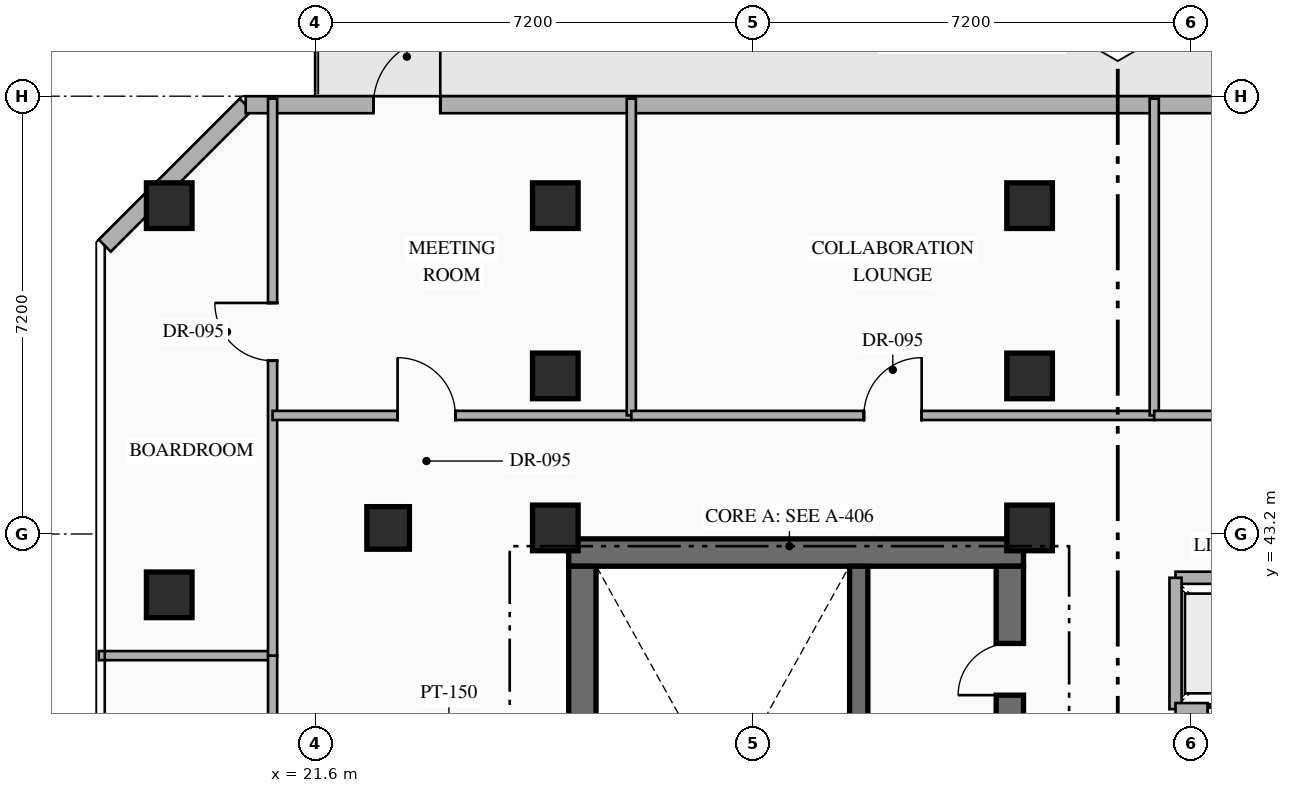
"""IFC4 building model, lengths in metres.
Left out: names, types, materials, properties, quantities, classifications, styles, units other than length and angle.
Written with IfcOpenShell. Run it as: python <this file> out.ifc"""

import sys

from ifc_helpers import new_model, si_unit, direction, frame, frame_2d, origin, origin_2d, place, context, subcontext, project, spatial, rectangle, hollow_rectangle, extrude, element, fill, save


model = new_model("IFC4")
c1 = context("Model", 3, precision=1e-05, world=origin(), true_north=direction((0.0, 1.0)))
c2 = subcontext(c1, "Body", "Model", "MODEL_VIEW")
j1 = project(units=[si_unit("LENGTHUNIT", "METRE"), si_unit("PLANEANGLEUNIT", "RADIAN")], contexts=[c1])
p1 = place(None, origin())
s1 = spatial("IfcSite", under=j1, at=p1, CompositionType="ELEMENT")
p2 = place(p1, origin())
s2 = spatial("IfcBuilding", under=s1, at=p2, CompositionType="ELEMENT")
p3 = place(p2, frame((0.0, 0.0, 202.35)))
s3 = spatial("IfcBuildingStorey", under=s2, at=p3, CompositionType="ELEMENT", Elevation=202.35)
p4 = place(p3, frame((25.77, 42.895, 0.0), z_axis=(0.0, 0.0, 1.0), x_axis=(1.0, 0.0, 0.0)))
e1 = element("IfcWall", 1, at=p4, inside=s3, PredefinedType="SHEAR", context=c2, shape_type="SweptSolid", body=[
    extrude(rectangle(XDim=7.48, YDim=0.45, at=frame_2d((3.74, 0.0))), origin(), (0.0, 0.0, 1.0), 3.6),
])
p5 = place(p3, frame((25.995, 33.19, 0.0), z_axis=(0.0, 0.0, 1.0), x_axis=(0.0, 1.0, 0.0)))
e2 = element("IfcWall", 2, at=p5, inside=s3, PredefinedType="SHEAR", context=c2, shape_type="SweptSolid", body=[
    extrude(rectangle(XDim=9.48, YDim=0.45, at=frame_2d((4.74, 0.0))), origin(), (0.0, 0.0, 1.0), 3.6),
])
p6 = place(p3, frame((33.025, 33.19, 0.0), z_axis=(0.0, 0.0, 1.0), x_axis=(0.0, 1.0, 0.0)))
e3 = element("IfcWall", 3, at=p6, inside=s3, PredefinedType="SHEAR", context=c2, shape_type="SweptSolid", body=[
    extrude(rectangle(XDim=9.48, YDim=0.45, at=frame_2d((4.74, 0.0))), origin(), (0.0, 0.0, 1.0), 3.6),
])
p7 = place(p6, frame((4.16, 0.0, 0.0)))
e4 = element("IfcOpeningElement", 4, at=p7, cuts=e3, PredefinedType="OPENING", context=c2, shape_type="SweptSolid", body=[
    extrude(rectangle(XDim=0.85, YDim=2.08, at=frame_2d((0.425, 1.04))), frame((0.0, 0.235, 0.0), z_axis=(0.0, -1.0, 0.0), x_axis=(1.0, 0.0, 0.0)), (0.0, 0.0, 1.0), 0.47),
])
p8 = place(p6, frame((7.36, 0.0, 0.0)))
e5 = element("IfcOpeningElement", 5, at=p8, cuts=e3, PredefinedType="OPENING", context=c2, shape_type="SweptSolid", body=[
    extrude(rectangle(XDim=0.85, YDim=2.08, at=frame_2d((0.425, 1.04))), frame((0.0, 0.235, 0.0), z_axis=(0.0, -1.0, 0.0), x_axis=(1.0, 0.0, 0.0)), (0.0, 0.0, 1.0), 0.47),
])
p9 = place(p3, frame((30.54, 33.19, 0.0), z_axis=(0.0, 0.0, 1.0), x_axis=(0.0, 1.0, 0.0)))
e6 = element("IfcWall", 6, at=p9, inside=s3, PredefinedType="SHEAR", context=c2, shape_type="SweptSolid", body=[
    extrude(rectangle(XDim=9.48, YDim=0.3, at=frame_2d((4.74, 0.0))), origin(), (0.0, 0.0, 1.0), 3.6),
])
for number, where, z_axis, x_axis in (
    (7, (25.55, 43.3, 0.0), (0.0, 0.0, 1.0), (1.0, 0.0, 0.0)),
    (8, (33.35, 43.3, 0.0), (0.0, 0.0, 1.0), (1.0, 0.0, 0.0)),
    (9, (25.55, 45.8, 0.0), (0.0, 0.0, 1.0), (1.0, 0.0, 0.0)),
    (10, (33.35, 45.8, 0.0), (0.0, 0.0, 1.0), (1.0, 0.0, 0.0)),
    (11, (19.2, 48.6, 0.0), (0.0, 0.0, 1.0), (1.0, 0.0, 0.0)),
    (12, (25.55, 48.6, 0.0), (0.0, 0.0, 1.0), (1.0, 0.0, 0.0)),
    (13, (33.35, 48.6, 0.0), (0.0, 0.0, 1.0), (1.0, 0.0, 0.0)),
    (14, (19.2, 42.2, 0.0), (0.0, 0.0, 1.0), (1.0, 0.0, 0.0)),
):
    element("IfcColumn", number, at=place(p3, frame(where, z_axis=z_axis, x_axis=x_axis)), inside=s3, PredefinedType="COLUMN", context=c2, shape_type="SweptSolid", body=[
        extrude(hollow_rectangle(XDim=0.75, YDim=0.75, WallThickness=0.028, at=origin_2d()), origin(), (0.0, 0.0, 1.0), 3.6),
    ])
p10 = place(p3, frame((22.8, 43.3, 0.0), z_axis=(0.0, 0.0, 1.0), x_axis=(1.0, 0.0, 0.0)))
e15 = element("IfcColumn", 15, at=p10, inside=s3, PredefinedType="COLUMN", context=c2, shape_type="SweptSolid", body=[
    extrude(hollow_rectangle(XDim=0.7, YDim=0.7, WallThickness=0.028, at=origin_2d()), origin(), (0.0, 0.0, 1.0), 3.6),
])
p11 = place(p3, frame((18.14, 47.942, 0.0), z_axis=(0.0, 0.0, 1.0), x_axis=(0.707106781187, 0.707106781187, 0.0)))
e16 = element("IfcWall", 16, at=p11, inside=s3, PredefinedType="STANDARD", context=c2, shape_type="SweptSolid", body=[
    extrude(rectangle(XDim=3.278, YDim=0.28, at=frame_2d((1.639, 0.0))), origin(), (0.0, 0.0, 1.0), 3.35),
])
p12 = place(p3, frame((20.458, 50.26, 0.0), z_axis=(0.0, 0.0, 1.0), x_axis=(1.0, 0.0, 0.0)))
e17 = element("IfcWall", 17, at=p12, inside=s3, PredefinedType="STANDARD", context=c2, shape_type="SweptSolid", body=[
    extrude(rectangle(XDim=22.084, YDim=0.28, at=frame_2d((11.042, 0.0))), origin(), (0.0, 0.0, 1.0), 3.35),
])
p13 = place(p12, frame((2.1, 0.0, 0.0)))
e18 = element("IfcOpeningElement", 18, at=p13, cuts=e17, PredefinedType="OPENING", context=c2, shape_type="SweptSolid", body=[
    extrude(rectangle(XDim=1.1, YDim=2.2, at=frame_2d((0.55, 1.1))), frame((0.0, 0.15, 0.0), z_axis=(0.0, -1.0, 0.0), x_axis=(1.0, 0.0, 0.0)), (0.0, 0.0, 1.0), 0.3),
])
p14 = place(p3, frame((35.75, 42.48, 0.0), z_axis=(0.0, 0.0, 1.0), x_axis=(1.0, 0.0, 0.0)))
e19 = element("IfcWall", 19, at=p14, inside=s3, PredefinedType="STANDARD", context=c2, shape_type="SweptSolid", body=[
    extrude(rectangle(XDim=9.11, YDim=0.2, at=frame_2d((4.555, 0.0))), origin(), (0.0, 0.0, 1.0), 3.35),
])
p15 = place(p3, frame((35.75, 40.32, 0.0), z_axis=(0.0, 0.0, 1.0), x_axis=(0.0, 1.0, 0.0)))
e20 = element("IfcWall", 20, at=p15, inside=s3, PredefinedType="STANDARD", context=c2, shape_type="SweptSolid", body=[
    extrude(rectangle(XDim=2.16, YDim=0.2, at=frame_2d((1.08, 0.0))), origin(), (0.0, 0.0, 1.0), 3.35),
])
p16 = place(p3, frame((35.75, 40.32, 0.0), z_axis=(0.0, 0.0, 1.0), x_axis=(1.0, 0.0, 0.0)))
e21 = element("IfcWall", 21, at=p16, inside=s3, PredefinedType="STANDARD", context=c2, shape_type="SweptSolid", body=[
    extrude(rectangle(XDim=9.11, YDim=0.2, at=frame_2d((4.555, 0.0))), origin(), (0.0, 0.0, 1.0), 3.35),
])
p17 = place(p16, frame((0.53, 0.0, 0.0)))
e22 = element("IfcOpeningElement", 22, at=p17, cuts=e21, PredefinedType="OPENING", context=c2, shape_type="SweptSolid", body=[
    extrude(rectangle(XDim=1.1, YDim=2.18, at=frame_2d((0.55, 1.09))), frame((0.0, 0.11, 0.0), z_axis=(0.0, -1.0, 0.0), x_axis=(1.0, 0.0, 0.0)), (0.0, 0.0, 1.0), 0.22),
])
p18 = place(p16, frame((2.73, 0.0, 0.0)))
e23 = element("IfcOpeningElement", 23, at=p18, cuts=e21, PredefinedType="OPENING", context=c2, shape_type="SweptSolid", body=[
    extrude(rectangle(XDim=1.1, YDim=2.18, at=frame_2d((0.55, 1.09))), frame((0.0, 0.11, 0.0), z_axis=(0.0, -1.0, 0.0), x_axis=(1.0, 0.0, 0.0)), (0.0, 0.0, 1.0), 0.22),
])
p19 = place(p16, frame((4.93, 0.0, 0.0)))
e24 = element("IfcOpeningElement", 24, at=p19, cuts=e21, PredefinedType="OPENING", context=c2, shape_type="SweptSolid", body=[
    extrude(rectangle(XDim=1.1, YDim=2.18, at=frame_2d((0.55, 1.09))), frame((0.0, 0.11, 0.0), z_axis=(0.0, -1.0, 0.0), x_axis=(1.0, 0.0, 0.0)), (0.0, 0.0, 1.0), 0.22),
])
p20 = place(p16, frame((7.13, 0.0, 0.0)))
e25 = element("IfcOpeningElement", 25, at=p20, cuts=e21, PredefinedType="OPENING", context=c2, shape_type="SweptSolid", body=[
    extrude(rectangle(XDim=1.1, YDim=2.18, at=frame_2d((0.55, 1.09))), frame((0.0, 0.11, 0.0), z_axis=(0.0, -1.0, 0.0), x_axis=(1.0, 0.0, 0.0)), (0.0, 0.0, 1.0), 0.22),
])
p21 = place(p3, frame((18.04, 41.2, 0.0), z_axis=(0.0, 0.0, 1.0), x_axis=(1.0, 0.0, 0.0)))
e26 = element("IfcWall", 26, at=p21, inside=s3, PredefinedType="PARTITIONING", context=c2, shape_type="SweptSolid", body=[
    extrude(rectangle(XDim=2.86, YDim=0.15, at=frame_2d((1.43, 0.0))), origin(), (0.0, 0.0, 1.0), 3.35),
])
p22 = place(p3, frame((20.9, 31.8, 0.0), z_axis=(0.0, 0.0, 1.0), x_axis=(0.0, 1.0, 0.0)))
e27 = element("IfcWall", 27, at=p22, inside=s3, PredefinedType="PARTITIONING", context=c2, shape_type="SweptSolid", body=[
    extrude(rectangle(XDim=9.4, YDim=0.15, at=frame_2d((4.7, 0.0))), origin(), (0.0, 0.0, 1.0), 3.35),
])
p23 = place(p22, frame((0.38, 0.0, 0.0)))
e28 = element("IfcOpeningElement", 28, at=p23, cuts=e27, PredefinedType="OPENING", context=c2, shape_type="SweptSolid", body=[
    extrude(rectangle(XDim=0.95, YDim=2.15, at=frame_2d((0.475, 1.075))), frame((0.0, 0.085, 0.0), z_axis=(0.0, -1.0, 0.0), x_axis=(1.0, 0.0, 0.0)), (0.0, 0.0, 1.0), 0.17),
])
p24 = place(p3, frame((20.9, 41.2, 0.0), z_axis=(0.0, 0.0, 1.0), x_axis=(0.0, 1.0, 0.0)))
e29 = element("IfcWall", 29, at=p24, inside=s3, PredefinedType="PARTITIONING", context=c2, shape_type="SweptSolid", body=[
    extrude(rectangle(XDim=9.16, YDim=0.15, at=frame_2d((4.58, 0.0))), origin(), (0.0, 0.0, 1.0), 3.35),
])
p25 = place(p24, frame((4.85, 0.0, 0.0)))
e30 = element("IfcOpeningElement", 30, at=p25, cuts=e29, PredefinedType="OPENING", context=c2, shape_type="SweptSolid", body=[
    extrude(rectangle(XDim=0.95, YDim=2.15, at=frame_2d((0.475, 1.075))), frame((0.0, 0.085, 0.0), z_axis=(0.0, -1.0, 0.0), x_axis=(1.0, 0.0, 0.0)), (0.0, 0.0, 1.0), 0.17),
])
p26 = place(p3, frame((20.9, 45.15, 0.0), z_axis=(0.0, 0.0, 1.0), x_axis=(1.0, 0.0, 0.0)))
e31 = element("IfcWall", 31, at=p26, inside=s3, PredefinedType="PARTITIONING", context=c2, shape_type="SweptSolid", body=[
    extrude(rectangle(XDim=5.9, YDim=0.15, at=frame_2d((2.95, 0.0))), origin(), (0.0, 0.0, 1.0), 3.35),
])
p27 = place(p26, frame((2.056, 0.0, 0.0)))
e32 = element("IfcOpeningElement", 32, at=p27, cuts=e31, PredefinedType="OPENING", context=c2, shape_type="SweptSolid", body=[
    extrude(rectangle(XDim=0.95, YDim=2.15, at=frame_2d((0.475, 1.075))), frame((0.0, 0.085, 0.0), z_axis=(0.0, -1.0, 0.0), x_axis=(1.0, 0.0, 0.0)), (0.0, 0.0, 1.0), 0.17),
])
p28 = place(p3, frame((26.8, 45.15, 0.0), z_axis=(0.0, 0.0, 1.0), x_axis=(0.0, 1.0, 0.0)))
e33 = element("IfcWall", 33, at=p28, inside=s3, PredefinedType="PARTITIONING", context=c2, shape_type="SweptSolid", body=[
    extrude(rectangle(XDim=5.21, YDim=0.15, at=frame_2d((2.605, 0.0))), origin(), (0.0, 0.0, 1.0), 3.35),
])
p29 = place(p3, frame((26.8, 45.15, 0.0), z_axis=(0.0, 0.0, 1.0), x_axis=(1.0, 0.0, 0.0)))
e34 = element("IfcWall", 34, at=p29, inside=s3, PredefinedType="PARTITIONING", context=c2, shape_type="SweptSolid", body=[
    extrude(rectangle(XDim=8.6, YDim=0.15, at=frame_2d((4.3, 0.0))), origin(), (0.0, 0.0, 1.0), 3.35),
])
p30 = place(p29, frame((3.825, 0.0, 0.0)))
e35 = element("IfcOpeningElement", 35, at=p30, cuts=e34, PredefinedType="OPENING", context=c2, shape_type="SweptSolid", body=[
    extrude(rectangle(XDim=0.95, YDim=2.15, at=frame_2d((0.475, 1.075))), frame((0.0, 0.085, 0.0), z_axis=(0.0, -1.0, 0.0), x_axis=(1.0, 0.0, 0.0)), (0.0, 0.0, 1.0), 0.17),
])
p31 = place(p3, frame((35.4, 45.15, 0.0), z_axis=(0.0, 0.0, 1.0), x_axis=(0.0, 1.0, 0.0)))
e36 = element("IfcWall", 36, at=p31, inside=s3, PredefinedType="PARTITIONING", context=c2, shape_type="SweptSolid", body=[
    extrude(rectangle(XDim=5.21, YDim=0.15, at=frame_2d((2.605, 0.0))), origin(), (0.0, 0.0, 1.0), 3.35),
])
p32 = place(p3, frame((35.4, 45.15, 0.0), z_axis=(0.0, 0.0, 1.0), x_axis=(1.0, 0.0, 0.0)))
e37 = element("IfcWall", 37, at=p32, inside=s3, PredefinedType="PARTITIONING", context=c2, shape_type="SweptSolid", body=[
    extrude(rectangle(XDim=9.56, YDim=0.15, at=frame_2d((4.78, 0.0))), origin(), (0.0, 0.0, 1.0), 3.35),
])
p33 = place(p32, frame((4.305, 0.0, 0.0)))
e38 = element("IfcOpeningElement", 38, at=p33, cuts=e37, PredefinedType="OPENING", context=c2, shape_type="SweptSolid", body=[
    extrude(rectangle(XDim=0.95, YDim=2.15, at=frame_2d((0.475, 1.075))), frame((0.0, 0.085, 0.0), z_axis=(0.0, -1.0, 0.0), x_axis=(1.0, 0.0, 0.0)), (0.0, 0.0, 1.0), 0.17),
])
p34 = place(p13, origin())
e39 = element("IfcDoor", 39, at=p34, inside=s3, OperationType="SINGLE_SWING_RIGHT", PredefinedType="DOOR", context=c2, shape_type="SweptSolid", body=[
    extrude(rectangle(XDim=1.1, YDim=2.2, at=frame_2d((0.55, 1.1))), frame((0.0, 0.025, 0.0), z_axis=(0.0, -1.0, 0.0), x_axis=(1.0, 0.0, 0.0)), (0.0, 0.0, 1.0), 0.05),
])
fill(e18, e39)
p35 = place(p8, origin())
e40 = element("IfcDoor", 40, at=p35, inside=s3, OperationType="SINGLE_SWING_LEFT", PredefinedType="DOOR", context=c2, shape_type="SweptSolid", body=[
    extrude(rectangle(XDim=0.85, YDim=2.08, at=frame_2d((0.425, 1.04))), frame((0.0, 0.025, 0.0), z_axis=(0.0, -1.0, 0.0), x_axis=(1.0, 0.0, 0.0)), (0.0, 0.0, 1.0), 0.05),
])
fill(e5, e40)
p36 = place(p17, origin())
e41 = element("IfcDoor", 41, at=p36, inside=s3, OperationType="SLIDING_TO_RIGHT", PredefinedType="USERDEFINED", context=c2, shape_type="SweptSolid", body=[
    extrude(rectangle(XDim=1.1, YDim=2.18, at=frame_2d((0.55, 1.09))), frame((0.0, 0.025, 0.0), z_axis=(0.0, -1.0, 0.0), x_axis=(1.0, 0.0, 0.0)), (0.0, 0.0, 1.0), 0.05),
])
fill(e22, e41)
p37 = place(p25, origin())
e42 = element("IfcDoor", 42, at=p37, inside=s3, OperationType="SINGLE_SWING_RIGHT", PredefinedType="DOOR", context=c2, shape_type="SweptSolid", body=[
    extrude(rectangle(XDim=0.95, YDim=2.15, at=frame_2d((0.475, 1.075))), frame((0.0, 0.025, 0.0), z_axis=(0.0, -1.0, 0.0), x_axis=(1.0, 0.0, 0.0)), (0.0, 0.0, 1.0), 0.05),
])
fill(e30, e42)
p38 = place(p27, origin())
e43 = element("IfcDoor", 43, at=p38, inside=s3, OperationType="SINGLE_SWING_LEFT", PredefinedType="DOOR", context=c2, shape_type="SweptSolid", body=[
    extrude(rectangle(XDim=0.95, YDim=2.15, at=frame_2d((0.475, 1.075))), frame((0.0, 0.025, 0.0), z_axis=(0.0, -1.0, 0.0), x_axis=(1.0, 0.0, 0.0)), (0.0, 0.0, 1.0), 0.05),
])
fill(e32, e43)
p39 = place(p30, origin())
e44 = element("IfcDoor", 44, at=p39, inside=s3, OperationType="SINGLE_SWING_RIGHT", PredefinedType="DOOR", context=c2, shape_type="SweptSolid", body=[
    extrude(rectangle(XDim=0.95, YDim=2.15, at=frame_2d((0.475, 1.075))), frame((0.0, 0.025, 0.0), z_axis=(0.0, -1.0, 0.0), x_axis=(1.0, 0.0, 0.0)), (0.0, 0.0, 1.0), 0.05),
])
fill(e35, e44)
save(model, sys.argv[1])
